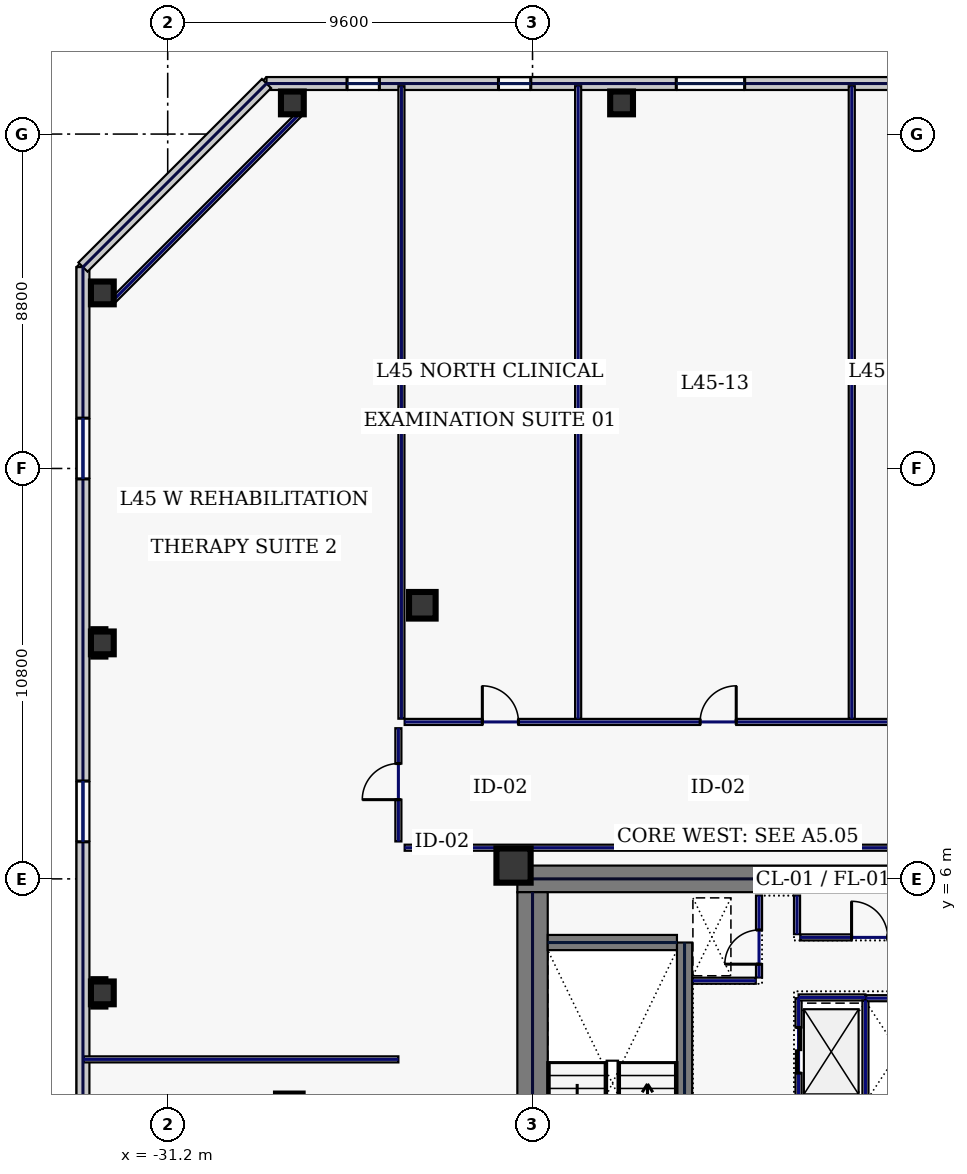
"""IFC4 building model, lengths in metres.
Left out: names, types, materials, properties, quantities, classifications, styles, units other than length and angle.
Written with IfcOpenShell. Run it as: python <this file> out.ifc"""

import sys

from ifc_helpers import new_model, si_unit, direction, frame, frame_2d, origin, origin_2d, place, context, subcontext, project, spatial, rectangle, hollow_rectangle, extrude, element, fill, save


model = new_model("IFC4")
c1 = context("Model", 3, precision=1e-05, world=origin(), true_north=direction((0.0, 1.0)))
c2 = subcontext(c1, "Body", "Model", "MODEL_VIEW")
j1 = project(units=[si_unit("LENGTHUNIT", "METRE"), si_unit("PLANEANGLEUNIT", "RADIAN")], contexts=[c1])
p1 = place(None, origin())
s1 = spatial("IfcSite", under=j1, at=p1, CompositionType="ELEMENT")
p2 = place(p1, origin())
s2 = spatial("IfcBuilding", under=s1, at=p2, CompositionType="ELEMENT")
p3 = place(p2, frame((0.0, 0.0, 196.2)))
s3 = spatial("IfcBuildingStorey", under=s2, at=p3, CompositionType="ELEMENT", Elevation=196.2)
p4 = place(p3, frame((-22.0, 6.0, 0.0), z_axis=(0.0, 0.0, 1.0), x_axis=(1.0, 0.0, 0.0)))
e1 = element("IfcWall", 1, at=p4, inside=s3, PredefinedType="SHEAR", context=c2, shape_type="SweptSolid", body=[
    extrude(rectangle(XDim=11.55, YDim=0.7, at=frame_2d((5.775, 0.0))), origin(), (0.0, 0.0, 1.0), 3.74),
])
p5 = place(p3, frame((-21.6, -5.65, 0.0), z_axis=(0.0, 0.0, 1.0), x_axis=(0.0, 1.0, 0.0)))
e2 = element("IfcWall", 2, at=p5, inside=s3, PredefinedType="SHEAR", context=c2, shape_type="SweptSolid", body=[
    extrude(rectangle(XDim=11.3, YDim=0.8, at=frame_2d((5.65, 0.0))), origin(), (0.0, 0.0, 1.0), 3.74),
])
p6 = place(p3, frame((-17.6, -4.325, 0.0), z_axis=(0.0, 0.0, 1.0), x_axis=(0.0, 1.0, 0.0)))
e3 = element("IfcWall", 3, at=p6, inside=s3, PredefinedType="SHEAR", context=c2, shape_type="SweptSolid", body=[
    extrude(rectangle(XDim=8.65, YDim=0.4, at=frame_2d((4.325, 0.0))), origin(), (0.0, 0.0, 1.0), 3.74),
])
p7 = place(p6, frame((0.25, 0.0, 0.0)))
e4 = element("IfcOpeningElement", 4, at=p7, cuts=e3, PredefinedType="OPENING", context=c2, shape_type="SweptSolid", body=[
    extrude(rectangle(XDim=1.1, YDim=2.2, at=frame_2d((0.55, 1.1))), frame((0.0, 0.21, 0.0), z_axis=(0.0, -1.0, 0.0), x_axis=(1.0, 0.0, 0.0)), (0.0, 0.0, 1.0), 0.42),
])
p8 = place(p3, frame((-21.2, 4.325, 0.0), z_axis=(0.0, 0.0, 1.0), x_axis=(1.0, 0.0, 0.0)))
e5 = element("IfcWall", 5, at=p8, inside=s3, PredefinedType="SHEAR", context=c2, shape_type="SweptSolid", body=[
    extrude(rectangle(XDim=3.4, YDim=0.4, at=frame_2d((1.7, 0.0))), origin(), (0.0, 0.0, 1.0), 3.74),
])
p9 = place(p3, frame((-22.1, 6.35, 0.0), z_axis=(0.0, 0.0, 1.0), x_axis=(1.0, 0.0, 0.0)))
e6 = element("IfcColumn", 6, at=p9, inside=s3, PredefinedType="COLUMN", context=c2, shape_type="SweptSolid", body=[
    extrude(hollow_rectangle(XDim=0.9, YDim=0.9, WallThickness=0.04, at=origin_2d()), origin(), (0.0, 0.0, 1.0), 3.74),
])
for number, where, z_axis, x_axis in (
    (7, (-24.5, 13.2, 0.0), (0.0, 0.0, 1.0), (1.0, 0.0, 0.0)),
    (8, (-28.0, 0.0, 0.0), (0.0, 0.0, 1.0), (1.0, 0.0, 0.0)),
):
    element("IfcColumn", number, at=place(p3, frame(where, z_axis=z_axis, x_axis=x_axis)), inside=s3, PredefinedType="COLUMN", context=c2, shape_type="SweptSolid", body=[
        extrude(hollow_rectangle(XDim=0.7, YDim=0.7, WallThickness=0.032, at=origin_2d()), origin(), (0.0, 0.0, 1.0), 3.74),
    ])
for number, where, z_axis, x_axis in (
    (9, (-19.257, 26.42, 0.0), (0.0, 0.0, 1.0), (1.0, 0.0, 0.0)),
    (10, (-27.92, 26.42, 0.0), (0.0, 0.0, 1.0), (1.0, 0.0, 0.0)),
    (11, (-32.92, 21.42, 0.0), (0.0, 0.0, 1.0), (1.0, 0.0, 0.0)),
    (12, (-32.92, 12.21, 0.0), (0.0, 0.0, 1.0), (1.0, 0.0, 0.0)),
    (13, (-32.92, 3.0, 0.0), (0.0, 0.0, 1.0), (1.0, 0.0, 0.0)),
):
    element("IfcColumn", number, at=place(p3, frame(where, z_axis=z_axis, x_axis=x_axis)), inside=s3, PredefinedType="COLUMN", context=c2, shape_type="SweptSolid", body=[
        extrude(hollow_rectangle(XDim=0.6, YDim=0.6, WallThickness=0.028, at=origin_2d()), origin(), (0.0, 0.0, 1.0), 3.74),
    ])
p10 = place(p3, frame((-8.663, 26.93, 0.0), z_axis=(0.0, 0.0, 1.0), x_axis=(-1.0, 0.0, 0.0)))
e14 = element("IfcWall", 14, at=p10, inside=s3, PredefinedType="STANDARD", context=c2, shape_type="SweptSolid", body=[
    extrude(rectangle(XDim=19.937, YDim=0.34, at=frame_2d((9.969, 0.0))), origin(), (0.0, 0.0, 1.0), 3.74),
])
p11 = place(p10, frame((16.968, 0.0, 0.7)))
e15 = element("IfcOpeningElement", 15, at=p11, cuts=e14, PredefinedType="OPENING", context=c2, shape_type="SweptSolid", body=[
    extrude(rectangle(XDim=0.85, YDim=1.85, at=frame_2d((0.425, 0.925))), frame((0.0, 0.18, 0.0), z_axis=(0.0, -1.0, 0.0), x_axis=(1.0, 0.0, 0.0)), (0.0, 0.0, 1.0), 0.36),
])
p12 = place(p10, frame((12.983, 0.0, 0.7)))
e16 = element("IfcOpeningElement", 16, at=p12, cuts=e14, PredefinedType="OPENING", context=c2, shape_type="SweptSolid", body=[
    extrude(rectangle(XDim=0.85, YDim=1.85, at=frame_2d((0.425, 0.925))), frame((0.0, 0.18, 0.0), z_axis=(0.0, -1.0, 0.0), x_axis=(1.0, 0.0, 0.0)), (0.0, 0.0, 1.0), 0.36),
])
p13 = place(p10, frame((7.355, 0.0, 0.7)))
e17 = element("IfcOpeningElement", 17, at=p13, cuts=e14, PredefinedType="OPENING", context=c2, shape_type="SweptSolid", body=[
    extrude(rectangle(XDim=1.8, YDim=2.2, at=frame_2d((0.9, 1.1))), frame((0.0, 0.18, 0.0), z_axis=(0.0, -1.0, 0.0), x_axis=(1.0, 0.0, 0.0)), (0.0, 0.0, 1.0), 0.36),
])
p14 = place(p3, frame((-33.43, 22.1, 0.0), z_axis=(0.0, 0.0, 1.0), x_axis=(0.0, -1.0, 0.0)))
e18 = element("IfcWall", 18, at=p14, inside=s3, PredefinedType="STANDARD", context=c2, shape_type="SweptSolid", body=[
    extrude(rectangle(XDim=38.2, YDim=0.34, at=frame_2d((19.1, 0.0))), origin(), (0.0, 0.0, 1.0), 3.74),
])
p15 = place(p14, frame((3.975, 0.0, 0.58)))
e19 = element("IfcOpeningElement", 19, at=p15, cuts=e18, PredefinedType="OPENING", context=c2, shape_type="SweptSolid", body=[
    extrude(rectangle(XDim=1.6, YDim=2.3, at=frame_2d((0.8, 1.15))), frame((0.0, 0.18, 0.0), z_axis=(0.0, -1.0, 0.0), x_axis=(1.0, 0.0, 0.0)), (0.0, 0.0, 1.0), 0.36),
])
p16 = place(p14, frame((13.525, 0.0, 0.58)))
e20 = element("IfcOpeningElement", 20, at=p16, cuts=e18, PredefinedType="OPENING", context=c2, shape_type="SweptSolid", body=[
    extrude(rectangle(XDim=1.6, YDim=2.3, at=frame_2d((0.8, 1.15))), frame((0.0, 0.18, 0.0), z_axis=(0.0, -1.0, 0.0), x_axis=(1.0, 0.0, 0.0)), (0.0, 0.0, 1.0), 0.36),
])
p17 = place(p14, frame((23.075, 0.0, 0.58)))
e21 = element("IfcOpeningElement", 21, at=p17, cuts=e18, PredefinedType="OPENING", context=c2, shape_type="SweptSolid", body=[
    extrude(rectangle(XDim=1.6, YDim=2.3, at=frame_2d((0.8, 1.15))), frame((0.0, 0.18, 0.0), z_axis=(0.0, -1.0, 0.0), x_axis=(1.0, 0.0, 0.0)), (0.0, 0.0, 1.0), 0.36),
])
p18 = place(p14, frame((32.625, 0.0, 0.58)))
e22 = element("IfcOpeningElement", 22, at=p18, cuts=e18, PredefinedType="OPENING", context=c2, shape_type="SweptSolid", body=[
    extrude(rectangle(XDim=1.6, YDim=2.3, at=frame_2d((0.8, 1.15))), frame((0.0, 0.18, 0.0), z_axis=(0.0, -1.0, 0.0), x_axis=(1.0, 0.0, 0.0)), (0.0, 0.0, 1.0), 0.36),
])
p19 = place(p3, frame((-28.6, 26.93, 0.0), z_axis=(0.0, 0.0, 1.0), x_axis=(-0.707106781187, -0.707106781187, 0.0)))
e23 = element("IfcWall", 23, at=p19, inside=s3, PredefinedType="STANDARD", context=c2, shape_type="SweptSolid", body=[
    extrude(rectangle(XDim=6.83, YDim=0.34, at=frame_2d((3.415, 0.0))), origin(), (0.0, 0.0, 1.0), 3.74),
])
p20 = place(p3, frame((-14.6, 0.12, 0.0), z_axis=(0.0, 0.0, 1.0), x_axis=(0.0, 1.0, 0.0)))
e24 = element("IfcWall", 24, at=p20, inside=s3, PredefinedType="PARTITIONING", context=c2, shape_type="SweptSolid", body=[
    extrude(rectangle(XDim=2.74, YDim=0.16, at=frame_2d((1.37, 0.0))), origin(), (0.0, 0.0, 1.0), 3.74),
])
p21 = place(p20, frame((0.77, 0.0, 0.0)))
e25 = element("IfcOpeningElement", 25, at=p21, cuts=e24, PredefinedType="OPENING", context=c2, shape_type="SweptSolid", body=[
    extrude(rectangle(XDim=1.2, YDim=2.2, at=frame_2d((0.6, 1.1))), frame((0.0, 0.09, 0.0), z_axis=(0.0, -1.0, 0.0), x_axis=(1.0, 0.0, 0.0)), (0.0, 0.0, 1.0), 0.18),
])
p22 = place(p3, frame((-14.6, 2.88, 0.0), z_axis=(0.0, 0.0, 1.0), x_axis=(1.0, 0.0, 0.0)))
e26 = element("IfcWall", 26, at=p22, inside=s3, PredefinedType="PARTITIONING", context=c2, shape_type="SweptSolid", body=[
    extrude(rectangle(XDim=1.76, YDim=0.16, at=frame_2d((0.88, 0.0))), origin(), (0.0, 0.0, 1.0), 3.74),
])
p23 = place(p3, frame((-12.84, 0.18, 0.0), z_axis=(0.0, 0.0, 1.0), x_axis=(0.0, 1.0, 0.0)))
e27 = element("IfcWall", 27, at=p23, inside=s3, PredefinedType="PARTITIONING", context=c2, shape_type="SweptSolid", body=[
    extrude(rectangle(XDim=2.62, YDim=0.16, at=frame_2d((1.31, 0.0))), origin(), (0.0, 0.0, 1.0), 3.74),
])
p24 = place(p3, frame((-12.82, 2.86, 0.0), z_axis=(0.0, 0.0, 1.0), x_axis=(1.0, 0.0, 0.0)))
e28 = element("IfcWall", 28, at=p24, inside=s3, PredefinedType="PARTITIONING", context=c2, shape_type="SweptSolid", body=[
    extrude(rectangle(XDim=1.72, YDim=0.16, at=frame_2d((0.86, 0.0))), origin(), (0.0, 0.0, 1.0), 3.74),
])
p25 = place(p3, frame((-15.64, 3.405, 0.0), z_axis=(0.0, 0.0, 1.0), x_axis=(0.0, 1.0, 0.0)))
e29 = element("IfcWall", 29, at=p25, inside=s3, PredefinedType="PARTITIONING", context=c2, shape_type="SweptSolid", body=[
    extrude(rectangle(XDim=2.155, YDim=0.16, at=frame_2d((1.078, 0.0))), origin(), (0.0, 0.0, 1.0), 3.74),
])
p26 = place(p25, frame((0.35, 0.0, 0.0)))
e30 = element("IfcOpeningElement", 30, at=p26, cuts=e29, PredefinedType="OPENING", context=c2, shape_type="SweptSolid", body=[
    extrude(rectangle(XDim=0.9, YDim=2.2, at=frame_2d((0.45, 1.1))), frame((0.0, 0.09, 0.0), z_axis=(0.0, -1.0, 0.0), x_axis=(1.0, 0.0, 0.0)), (0.0, 0.0, 1.0), 0.18),
])
p27 = place(p3, frame((-17.38, 3.32, 0.0), z_axis=(0.0, 0.0, 1.0), x_axis=(1.0, 0.0, 0.0)))
e31 = element("IfcWall", 31, at=p27, inside=s3, PredefinedType="PARTITIONING", context=c2, shape_type="SweptSolid", body=[
    extrude(rectangle(XDim=1.655, YDim=0.16, at=frame_2d((0.827, 0.0))), origin(), (0.0, 0.0, 1.0), 3.74),
])
p28 = place(p3, frame((-14.555, 4.46, 0.0), z_axis=(0.0, 0.0, 1.0), x_axis=(1.0, 0.0, 0.0)))
e32 = element("IfcWall", 32, at=p28, inside=s3, PredefinedType="PARTITIONING", context=c2, shape_type="SweptSolid", body=[
    extrude(rectangle(XDim=3.755, YDim=0.16, at=frame_2d((1.877, 0.0))), origin(), (0.0, 0.0, 1.0), 3.74),
])
p29 = place(p28, frame((1.35, 0.0, 0.0)))
e33 = element("IfcOpeningElement", 33, at=p29, cuts=e32, PredefinedType="OPENING", context=c2, shape_type="SweptSolid", body=[
    extrude(rectangle(XDim=0.95, YDim=2.2, at=frame_2d((0.475, 1.1))), frame((0.0, 0.09, 0.0), z_axis=(0.0, -1.0, 0.0), x_axis=(1.0, 0.0, 0.0)), (0.0, 0.0, 1.0), 0.18),
])
p30 = place(p3, frame((-14.64, 4.545, 0.0), z_axis=(0.0, 0.0, 1.0), x_axis=(0.0, 1.0, 0.0)))
e34 = element("IfcWall", 34, at=p30, inside=s3, PredefinedType="PARTITIONING", context=c2, shape_type="SweptSolid", body=[
    extrude(rectangle(XDim=1.015, YDim=0.16, at=frame_2d((0.508, 0.0))), origin(), (0.0, 0.0, 1.0), 3.74),
])
p31 = place(p3, frame((-27.68, 26.18, 0.0), z_axis=(0.0, 0.0, 1.0), x_axis=(-0.707106781187, -0.707106781187, 0.0)))
e35 = element("IfcWall", 35, at=p31, inside=s3, PredefinedType="PARTITIONING", context=c2, shape_type="SweptSolid", body=[
    extrude(rectangle(XDim=7.071, YDim=0.16, at=frame_2d((3.536, 0.0))), origin(), (0.0, 0.0, 1.0), 3.74),
])
p32 = place(p3, frame((-10.63, 6.82, 0.0), z_axis=(0.0, 0.0, 1.0), x_axis=(-1.0, 0.0, 0.0)))
e36 = element("IfcWall", 36, at=p32, inside=s3, PredefinedType="PARTITIONING", context=c2, shape_type="SweptSolid", body=[
    extrude(rectangle(XDim=14.335, YDim=0.16, at=frame_2d((7.167, 0.0))), origin(), (0.0, 0.0, 1.0), 3.74),
])
p33 = place(p3, frame((-25.13, 6.985, 0.0), z_axis=(0.0, 0.0, 1.0), x_axis=(0.0, 1.0, 0.0)))
e37 = element("IfcWall", 37, at=p33, inside=s3, PredefinedType="PARTITIONING", context=c2, shape_type="SweptSolid", body=[
    extrude(rectangle(XDim=2.98, YDim=0.16, at=frame_2d((1.49, 0.0))), origin(), (0.0, 0.0, 1.0), 3.74),
])
p34 = place(p33, frame((1.1, 0.0, 0.0)))
e38 = element("IfcOpeningElement", 38, at=p34, cuts=e37, PredefinedType="OPENING", context=c2, shape_type="SweptSolid", body=[
    extrude(rectangle(XDim=0.95, YDim=2.2, at=frame_2d((0.475, 1.1))), frame((0.0, 0.09, 0.0), z_axis=(0.0, -1.0, 0.0), x_axis=(1.0, 0.0, 0.0)), (0.0, 0.0, 1.0), 0.18),
])
p35 = place(p3, frame((-24.965, 10.13, 0.0), z_axis=(0.0, 0.0, 1.0), x_axis=(1.0, 0.0, 0.0)))
e39 = element("IfcWall", 39, at=p35, inside=s3, PredefinedType="PARTITIONING", context=c2, shape_type="SweptSolid", body=[
    extrude(rectangle(XDim=49.93, YDim=0.16, at=frame_2d((24.965, 0.0))), origin(), (0.0, 0.0, 1.0), 3.74),
])
p36 = place(p35, frame((2.044, 0.0, 0.0)))
e40 = element("IfcOpeningElement", 40, at=p36, cuts=e39, PredefinedType="OPENING", context=c2, shape_type="SweptSolid", body=[
    extrude(rectangle(XDim=0.95, YDim=2.2, at=frame_2d((0.475, 1.1))), frame((0.0, 0.09, 0.0), z_axis=(0.0, -1.0, 0.0), x_axis=(1.0, 0.0, 0.0)), (0.0, 0.0, 1.0), 0.18),
])
p37 = place(p35, frame((7.775, 0.0, 0.0)))
e41 = element("IfcOpeningElement", 41, at=p37, cuts=e39, PredefinedType="OPENING", context=c2, shape_type="SweptSolid", body=[
    extrude(rectangle(XDim=0.95, YDim=2.2, at=frame_2d((0.475, 1.1))), frame((0.0, 0.09, 0.0), z_axis=(0.0, -1.0, 0.0), x_axis=(1.0, 0.0, 0.0)), (0.0, 0.0, 1.0), 0.18),
])
p38 = place(p35, frame((15.275, 0.0, 0.0)))
e42 = element("IfcOpeningElement", 42, at=p38, cuts=e39, PredefinedType="OPENING", context=c2, shape_type="SweptSolid", body=[
    extrude(rectangle(XDim=0.95, YDim=2.2, at=frame_2d((0.475, 1.1))), frame((0.0, 0.09, 0.0), z_axis=(0.0, -1.0, 0.0), x_axis=(1.0, 0.0, 0.0)), (0.0, 0.0, 1.0), 0.18),
])
p39 = place(p35, frame((21.475, 0.0, 0.0)))
e43 = element("IfcOpeningElement", 43, at=p39, cuts=e39, PredefinedType="OPENING", context=c2, shape_type="SweptSolid", body=[
    extrude(rectangle(XDim=1.3, YDim=2.2, at=frame_2d((0.65, 1.1))), frame((0.0, 0.09, 0.0), z_axis=(0.0, -1.0, 0.0), x_axis=(1.0, 0.0, 0.0)), (0.0, 0.0, 1.0), 0.18),
])
p40 = place(p35, frame((26.15, 0.0, 0.0)))
e44 = element("IfcOpeningElement", 44, at=p40, cuts=e39, PredefinedType="OPENING", context=c2, shape_type="SweptSolid", body=[
    extrude(rectangle(XDim=0.95, YDim=2.2, at=frame_2d((0.475, 1.1))), frame((0.0, 0.09, 0.0), z_axis=(0.0, -1.0, 0.0), x_axis=(1.0, 0.0, 0.0)), (0.0, 0.0, 1.0), 0.18),
])
p41 = place(p35, frame((32.575, 0.0, 0.0)))
e45 = element("IfcOpeningElement", 45, at=p41, cuts=e39, PredefinedType="OPENING", context=c2, shape_type="SweptSolid", body=[
    extrude(rectangle(XDim=0.95, YDim=2.2, at=frame_2d((0.475, 1.1))), frame((0.0, 0.09, 0.0), z_axis=(0.0, -1.0, 0.0), x_axis=(1.0, 0.0, 0.0)), (0.0, 0.0, 1.0), 0.18),
])
p42 = place(p35, frame((40.675, 0.0, 0.0)))
e46 = element("IfcOpeningElement", 46, at=p42, cuts=e39, PredefinedType="OPENING", context=c2, shape_type="SweptSolid", body=[
    extrude(rectangle(XDim=0.95, YDim=2.2, at=frame_2d((0.475, 1.1))), frame((0.0, 0.09, 0.0), z_axis=(0.0, -1.0, 0.0), x_axis=(1.0, 0.0, 0.0)), (0.0, 0.0, 1.0), 0.18),
])
p43 = place(p35, frame((46.631, 0.0, 0.0)))
e47 = element("IfcOpeningElement", 47, at=p43, cuts=e39, PredefinedType="OPENING", context=c2, shape_type="SweptSolid", body=[
    extrude(rectangle(XDim=1.3, YDim=2.2, at=frame_2d((0.65, 1.1))), frame((0.0, 0.09, 0.0), z_axis=(0.0, -1.0, 0.0), x_axis=(1.0, 0.0, 0.0)), (0.0, 0.0, 1.0), 0.18),
])
p44 = place(p3, frame((-25.05, 10.215, 0.0), z_axis=(0.0, 0.0, 1.0), x_axis=(0.0, 1.0, 0.0)))
e48 = element("IfcWall", 48, at=p44, inside=s3, PredefinedType="PARTITIONING", context=c2, shape_type="SweptSolid", body=[
    extrude(rectangle(XDim=16.645, YDim=0.16, at=frame_2d((8.323, 0.0))), origin(), (0.0, 0.0, 1.0), 3.285),
])
for number, where, z_axis, x_axis in (
    (49, (-20.4, 10.215, 0.0), (0.0, 0.0, 1.0), (0.0, 1.0, 0.0)),
    (50, (-13.2, 10.215, 0.0), (0.0, 0.0, 1.0), (0.0, 1.0, 0.0)),
):
    element("IfcWall", number, at=place(p3, frame(where, z_axis=z_axis, x_axis=x_axis)), inside=s3, PredefinedType="PARTITIONING", context=c2, shape_type="SweptSolid", body=[
        extrude(rectangle(XDim=16.645, YDim=0.16, at=frame_2d((8.323, 0.0))), origin(), (0.0, 0.0, 1.0), 3.74),
    ])
p45 = place(p3, frame((-33.41, 1.25, 0.0), z_axis=(0.0, 0.0, 1.0), x_axis=(1.0, 0.0, 0.0)))
e51 = element("IfcWall", 51, at=p45, inside=s3, PredefinedType="PARTITIONING", context=c2, shape_type="SweptSolid", body=[
    extrude(rectangle(XDim=8.28, YDim=0.16, at=frame_2d((4.14, 0.0))), origin(), (0.0, 0.0, 1.0), 3.74),
])
p46 = place(p11, origin())
e52 = element("IfcWindow", 52, at=p46, inside=s3, PartitioningType="SINGLE_PANEL", PredefinedType="WINDOW", context=c2, shape_type="SweptSolid", body=[
    extrude(rectangle(XDim=0.85, YDim=1.85, at=frame_2d((0.425, 0.925))), frame((0.0, 0.03, 0.0), z_axis=(0.0, -1.0, 0.0), x_axis=(1.0, 0.0, 0.0)), (0.0, 0.0, 1.0), 0.06),
])
fill(e15, e52)
p47 = place(p12, origin())
e53 = element("IfcWindow", 53, at=p47, inside=s3, PartitioningType="SINGLE_PANEL", PredefinedType="WINDOW", context=c2, shape_type="SweptSolid", body=[
    extrude(rectangle(XDim=0.85, YDim=1.85, at=frame_2d((0.425, 0.925))), frame((0.0, 0.03, 0.0), z_axis=(0.0, -1.0, 0.0), x_axis=(1.0, 0.0, 0.0)), (0.0, 0.0, 1.0), 0.06),
])
fill(e16, e53)
p48 = place(p13, origin())
e54 = element("IfcWindow", 54, at=p48, inside=s3, PartitioningType="SINGLE_PANEL", PredefinedType="WINDOW", context=c2, shape_type="SweptSolid", body=[
    extrude(rectangle(XDim=1.8, YDim=2.2, at=frame_2d((0.9, 1.1))), frame((0.0, 0.03, 0.0), z_axis=(0.0, -1.0, 0.0), x_axis=(1.0, 0.0, 0.0)), (0.0, 0.0, 1.0), 0.06),
])
fill(e17, e54)
p49 = place(p15, origin())
e55 = element("IfcWindow", 55, at=p49, inside=s3, PartitioningType="SINGLE_PANEL", PredefinedType="WINDOW", context=c2, shape_type="SweptSolid", body=[
    extrude(rectangle(XDim=1.6, YDim=2.3, at=frame_2d((0.8, 1.15))), frame((0.0, 0.03, 0.0), z_axis=(0.0, -1.0, 0.0), x_axis=(1.0, 0.0, 0.0)), (0.0, 0.0, 1.0), 0.06),
])
fill(e19, e55)
p50 = place(p16, origin())
e56 = element("IfcWindow", 56, at=p50, inside=s3, PartitioningType="SINGLE_PANEL", PredefinedType="WINDOW", context=c2, shape_type="SweptSolid", body=[
    extrude(rectangle(XDim=1.6, YDim=2.3, at=frame_2d((0.8, 1.15))), frame((0.0, 0.03, 0.0), z_axis=(0.0, -1.0, 0.0), x_axis=(1.0, 0.0, 0.0)), (0.0, 0.0, 1.0), 0.06),
])
fill(e20, e56)
p51 = place(p21, origin())
e57 = element("IfcDoor", 57, at=p51, inside=s3, OperationType="SLIDING_TO_LEFT", PredefinedType="DOOR", context=c2, shape_type="SweptSolid", body=[
    extrude(rectangle(XDim=1.2, YDim=2.2, at=frame_2d((0.6, 1.1))), frame((0.0, 0.025, 0.0), z_axis=(0.0, -1.0, 0.0), x_axis=(1.0, 0.0, 0.0)), (0.0, 0.0, 1.0), 0.05),
])
fill(e25, e57)
p52 = place(p26, origin())
e58 = element("IfcDoor", 58, at=p52, inside=s3, OperationType="SINGLE_SWING_LEFT", PredefinedType="DOOR", context=c2, shape_type="SweptSolid", body=[
    extrude(rectangle(XDim=0.9, YDim=2.2, at=frame_2d((0.45, 1.1))), frame((0.0, 0.025, 0.0), z_axis=(0.0, -1.0, 0.0), x_axis=(1.0, 0.0, 0.0)), (0.0, 0.0, 1.0), 0.05),
])
fill(e30, e58)
p53 = place(p29, origin())
e59 = element("IfcDoor", 59, at=p53, inside=s3, OperationType="SINGLE_SWING_LEFT", PredefinedType="DOOR", context=c2, shape_type="SweptSolid", body=[
    extrude(rectangle(XDim=0.95, YDim=2.2, at=frame_2d((0.475, 1.1))), frame((0.0, 0.025, 0.0), z_axis=(0.0, -1.0, 0.0), x_axis=(1.0, 0.0, 0.0)), (0.0, 0.0, 1.0), 0.05),
])
fill(e33, e59)
p54 = place(p36, origin())
e60 = element("IfcDoor", 60, at=p54, inside=s3, OperationType="SINGLE_SWING_LEFT", PredefinedType="DOOR", context=c2, shape_type="SweptSolid", body=[
    extrude(rectangle(XDim=0.95, YDim=2.2, at=frame_2d((0.475, 1.1))), frame((0.0, 0.025, 0.0), z_axis=(0.0, -1.0, 0.0), x_axis=(1.0, 0.0, 0.0)), (0.0, 0.0, 1.0), 0.05),
])
fill(e40, e60)
p55 = place(p37, origin())
e61 = element("IfcDoor", 61, at=p55, inside=s3, OperationType="SINGLE_SWING_RIGHT", PredefinedType="DOOR", context=c2, shape_type="SweptSolid", body=[
    extrude(rectangle(XDim=0.95, YDim=2.2, at=frame_2d((0.475, 1.1))), frame((0.0, 0.025, 0.0), z_axis=(0.0, -1.0, 0.0), x_axis=(1.0, 0.0, 0.0)), (0.0, 0.0, 1.0), 0.05),
])
fill(e41, e61)
p56 = place(p34, origin())
e62 = element("IfcDoor", 62, at=p56, inside=s3, OperationType="SINGLE_SWING_LEFT", PredefinedType="DOOR", context=c2, shape_type="SweptSolid", body=[
    extrude(rectangle(XDim=0.95, YDim=2.2, at=frame_2d((0.475, 1.1))), frame((0.0, 0.025, 0.0), z_axis=(0.0, -1.0, 0.0), x_axis=(1.0, 0.0, 0.0)), (0.0, 0.0, 1.0), 0.05),
])
fill(e38, e62)
save(model, sys.argv[1])
